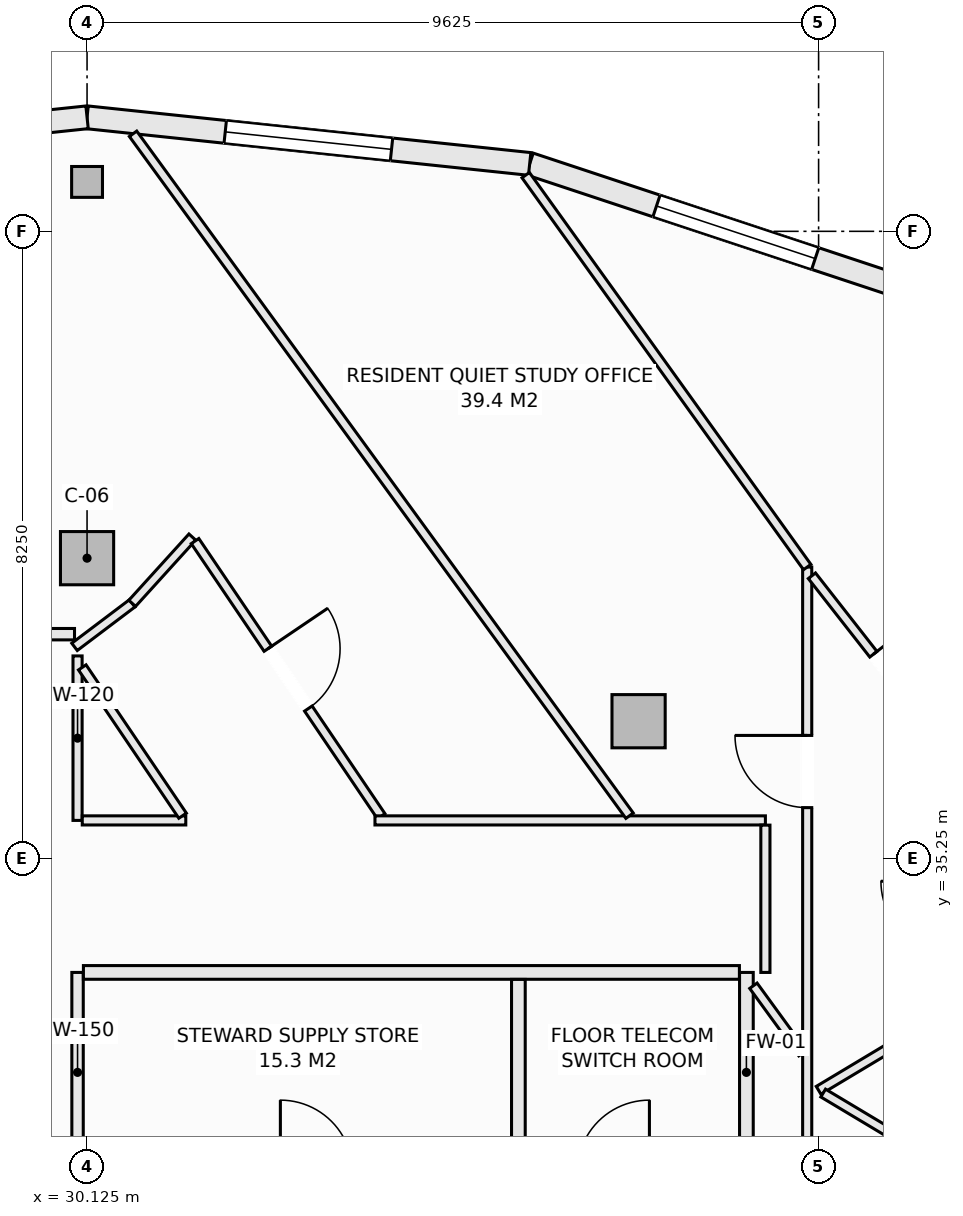
"""IFC4 building model, lengths in metres.
Left out: names, types, materials, properties, quantities, classifications, styles, units other than length and angle.
Written with IfcOpenShell. Run it as: python <this file> out.ifc"""

import sys

from ifc_helpers import new_model, si_unit, direction, frame, frame_2d, origin, origin_2d, place, context, subcontext, project, spatial, rectangle, hollow_rectangle, extrude, element, fill, save


model = new_model("IFC4")
c1 = context("Model", 3, precision=1e-05, world=origin(), true_north=direction((0.0, 1.0)))
c2 = subcontext(c1, "Body", "Model", "MODEL_VIEW")
j1 = project(units=[si_unit("LENGTHUNIT", "METRE"), si_unit("PLANEANGLEUNIT", "RADIAN")], contexts=[c1])
p1 = place(None, origin())
s1 = spatial("IfcSite", under=j1, at=p1, CompositionType="ELEMENT")
p2 = place(p1, origin())
s2 = spatial("IfcBuilding", under=s1, at=p2, CompositionType="ELEMENT")
p3 = place(p2, frame((0.0, 0.0, 245.9)))
s3 = spatial("IfcBuildingStorey", under=s2, at=p3, CompositionType="ELEMENT", Elevation=245.9)
p4 = place(p3, frame((30.125, 44.15, -0.27), z_axis=(0.0, 0.0, 1.0), x_axis=(1.0, 0.0, 0.0)))
e1 = element("IfcColumn", 1, at=p4, inside=s3, PredefinedType="COLUMN", context=c2, shape_type="SweptSolid", body=[
    extrude(hollow_rectangle(XDim=0.406, YDim=0.406, WallThickness=0.016, at=origin_2d()), origin(), (0.0, 0.0, 1.0), 3.3),
])
for number, where, z_axis, x_axis in (
    (2, (37.382, 37.055, -0.27), (0.0, 0.0, 1.0), (1.0, 0.0, 0.0)),
    (3, (30.125, 39.2, -0.27), (0.0, 0.0, 1.0), (1.0, 0.0, 0.0)),
):
    element("IfcColumn", number, at=place(p3, frame(where, z_axis=z_axis, x_axis=x_axis)), inside=s3, PredefinedType="COLUMN", context=c2, shape_type="SweptSolid", body=[
        extrude(rectangle(XDim=0.7, YDim=0.7, at=origin_2d()), origin(), (0.0, 0.0, 1.0), 3.3),
    ])
p5 = place(p3, frame((35.948, 44.387, 0.0), z_axis=(0.0, 0.0, 1.0), x_axis=(0.949232769585, -0.314574552605, 0.0)))
e4 = element("IfcWall", 4, at=p5, inside=s3, PredefinedType="SOLIDWALL", context=c2, shape_type="SweptSolid", body=[
    extrude(rectangle(XDim=5.717, YDim=0.3, at=frame_2d((2.858, 0.0))), origin(), (0.0, 0.0, 1.0), 2.605),
])
p6 = place(p5, frame((1.758, 0.0, 0.72)))
e5 = element("IfcOpeningElement", 5, at=p6, cuts=e4, PredefinedType="OPENING", context=c2, shape_type="SweptSolid", body=[
    extrude(rectangle(XDim=2.2, YDim=1.65, at=frame_2d((1.1, 0.825))), frame((0.0, 0.16, 0.0), z_axis=(0.0, -1.0, 0.0), x_axis=(1.0, 0.0, 0.0)), (0.0, 0.0, 1.0), 0.32),
])
p7 = place(p3, frame((30.125, 45.0, 0.0), z_axis=(0.0, 0.0, 1.0), x_axis=(0.994500425783, -0.10473253132, 0.0)))
e6 = element("IfcWall", 6, at=p7, inside=s3, PredefinedType="SOLIDWALL", context=c2, shape_type="SweptSolid", body=[
    extrude(rectangle(XDim=5.856, YDim=0.3, at=frame_2d((2.928, 0.0))), origin(), (0.0, 0.0, 1.0), 2.605),
])
p8 = place(p7, frame((1.828, 0.0, 0.72)))
e7 = element("IfcOpeningElement", 7, at=p8, cuts=e6, PredefinedType="OPENING", context=c2, shape_type="SweptSolid", body=[
    extrude(rectangle(XDim=2.2, YDim=1.65, at=frame_2d((1.1, 0.825))), frame((0.0, 0.16, 0.0), z_axis=(0.0, -1.0, 0.0), x_axis=(1.0, 0.0, 0.0)), (0.0, 0.0, 1.0), 0.32),
])
p9 = place(p3, frame((24.302, 44.387, 0.0), z_axis=(0.0, 0.0, 1.0), x_axis=(0.994500425783, 0.10473253132, 0.0)))
e8 = element("IfcWall", 8, at=p9, inside=s3, PredefinedType="SOLIDWALL", context=c2, shape_type="SweptSolid", body=[
    extrude(rectangle(XDim=5.856, YDim=0.3, at=frame_2d((2.928, 0.0))), origin(), (0.0, 0.0, 1.0), 2.605),
])
p10 = place(p9, frame((1.828, 0.0, 0.72)))
e9 = element("IfcOpeningElement", 9, at=p10, cuts=e8, PredefinedType="OPENING", context=c2, shape_type="SweptSolid", body=[
    extrude(rectangle(XDim=2.2, YDim=1.65, at=frame_2d((1.1, 0.825))), frame((0.0, 0.16, 0.0), z_axis=(0.0, -1.0, 0.0), x_axis=(1.0, 0.0, 0.0)), (0.0, 0.0, 1.0), 0.32),
])
p11 = place(p3, frame((30.0, 31.12, 0.0), z_axis=(0.0, 0.0, 1.0), x_axis=(0.0, 1.0, 0.0)))
e10 = element("IfcWall", 10, at=p11, inside=s3, PredefinedType="PARTITIONING", context=c2, shape_type="SweptSolid", body=[
    extrude(rectangle(XDim=2.63, YDim=0.15, at=frame_2d((1.315, 0.0))), origin(), (0.0, 0.0, 1.0), 3.03),
])
p12 = place(p3, frame((30.0, 35.75, 0.0), z_axis=(0.0, 0.0, 1.0), x_axis=(0.0, 1.0, 0.0)))
e11 = element("IfcWall", 11, at=p12, inside=s3, PredefinedType="PARTITIONING", context=c2, shape_type="SweptSolid", body=[
    extrude(rectangle(XDim=2.164, YDim=0.12, at=frame_2d((1.082, 0.0))), origin(), (0.0, 0.0, 1.0), 3.03),
])
p13 = place(p3, frame((38.8, 31.12, 0.0), z_axis=(0.0, 0.0, 1.0), x_axis=(0.0, 1.0, 0.0)))
e12 = element("IfcWall", 12, at=p13, inside=s3, PredefinedType="SOLIDWALL", context=c2, shape_type="SweptSolid", body=[
    extrude(rectangle(XDim=2.63, YDim=0.18, at=frame_2d((1.315, 0.0))), origin(), (0.0, 0.0, 1.0), 3.03),
])
p14 = place(p3, frame((30.077, 33.75, 0.0), z_axis=(0.0, 0.0, 1.0), x_axis=(1.0, 0.0, 0.0)))
e13 = element("IfcWall", 13, at=p14, inside=s3, PredefinedType="SOLIDWALL", context=c2, shape_type="SweptSolid", body=[
    extrude(rectangle(XDim=8.631, YDim=0.18, at=frame_2d((4.315, 0.0))), origin(), (0.0, 0.0, 1.0), 3.03),
])
p15 = place(p3, frame((35.8, 31.212, 0.0), z_axis=(0.0, 0.0, 1.0), x_axis=(0.0, 1.0, 0.0)))
e14 = element("IfcWall", 14, at=p15, inside=s3, PredefinedType="SOLIDWALL", context=c2, shape_type="SweptSolid", body=[
    extrude(rectangle(XDim=2.446, YDim=0.18, at=frame_2d((1.223, 0.0))), origin(), (0.0, 0.0, 1.0), 3.03),
])
p16 = place(p3, frame((27.227, 38.2, 0.0), z_axis=(0.0, 0.0, 1.0), x_axis=(1.0, 0.0, 0.0)))
e15 = element("IfcWall", 15, at=p16, inside=s3, PredefinedType="PARTITIONING", context=c2, shape_type="SweptSolid", body=[
    extrude(rectangle(XDim=2.733, YDim=0.15, at=frame_2d((1.366, 0.0))), origin(), (0.0, 0.0, 1.0), 3.03),
])
p17 = place(p3, frame((29.96, 38.033, 0.0), z_axis=(0.0, 0.0, 1.0), x_axis=(0.79811694623, 0.602502564426, 0.0)))
e16 = element("IfcWall", 16, at=p17, inside=s3, PredefinedType="PARTITIONING", context=c2, shape_type="SweptSolid", body=[
    extrude(rectangle(XDim=0.951, YDim=0.12, at=frame_2d((0.476, 0.0))), origin(), (0.0, 0.0, 1.0), 3.03),
])
p18 = place(p3, frame((30.719, 38.606, 0.0), z_axis=(0.0, 0.0, 1.0), x_axis=(0.671846687959, 0.740690237466, 0.0)))
e17 = element("IfcWall", 17, at=p18, inside=s3, PredefinedType="PARTITIONING", context=c2, shape_type="SweptSolid", body=[
    extrude(rectangle(XDim=1.177, YDim=0.12, at=frame_2d((0.589, 0.0))), origin(), (0.0, 0.0, 1.0), 3.03),
])
p19 = place(p3, frame((31.546, 39.425, 0.0), z_axis=(0.0, 0.0, 1.0), x_axis=(0.56035895857, -0.828249864202, 0.0)))
e18 = element("IfcWall", 18, at=p19, inside=s3, PredefinedType="PARTITIONING", context=c2, shape_type="SweptSolid", body=[
    extrude(rectangle(XDim=4.371, YDim=0.12, at=frame_2d((2.186, 0.0))), origin(), (0.0, 0.0, 1.0), 3.03),
])
p20 = place(p19, frame((1.71, 0.0, 0.0)))
e19 = element("IfcOpeningElement", 19, at=p20, cuts=e18, PredefinedType="OPENING", context=c2, shape_type="SweptSolid", body=[
    extrude(rectangle(XDim=0.95, YDim=2.1, at=frame_2d((0.475, 1.05))), frame((0.0, 0.07, 0.0), z_axis=(0.0, -1.0, 0.0), x_axis=(1.0, 0.0, 0.0)), (0.0, 0.0, 1.0), 0.14),
])
p21 = place(p3, frame((30.062, 35.75, 0.0), z_axis=(0.0, 0.0, 1.0), x_axis=(1.0, 0.0, 0.0)))
e20 = element("IfcWall", 20, at=p21, inside=s3, PredefinedType="PARTITIONING", context=c2, shape_type="SweptSolid", body=[
    extrude(rectangle(XDim=1.362, YDim=0.12, at=frame_2d((0.681, 0.0))), origin(), (0.0, 0.0, 1.0), 3.03),
])
p22 = place(p3, frame((33.913, 35.75, 0.0), z_axis=(0.0, 0.0, 1.0), x_axis=(1.0, 0.0, 0.0)))
e21 = element("IfcWall", 21, at=p22, inside=s3, PredefinedType="PARTITIONING", context=c2, shape_type="SweptSolid", body=[
    extrude(rectangle(XDim=5.137, YDim=0.12, at=frame_2d((2.568, 0.0))), origin(), (0.0, 0.0, 1.0), 2.478),
])
p23 = place(p3, frame((39.05, 33.75, 0.0), z_axis=(0.0, 0.0, 1.0), x_axis=(0.0, 1.0, 0.0)))
e22 = element("IfcWall", 22, at=p23, inside=s3, PredefinedType="PARTITIONING", context=c2, shape_type="SweptSolid", body=[
    extrude(rectangle(XDim=1.938, YDim=0.12, at=frame_2d((0.969, 0.0))), origin(), (0.0, 0.0, 1.0), 3.03),
])
p24 = place(p3, frame((39.6, 31.212, 0.0), z_axis=(0.0, 0.0, 1.0), x_axis=(0.0, 1.0, 0.0)))
e23 = element("IfcWall", 23, at=p24, inside=s3, PredefinedType="PARTITIONING", context=c2, shape_type="SweptSolid", body=[
    extrude(rectangle(XDim=7.871, YDim=0.12, at=frame_2d((3.936, 0.0))), origin(), (0.0, 0.0, 1.0), 3.03),
])
p25 = place(p24, frame((4.706, 0.0, 0.0)))
e24 = element("IfcOpeningElement", 24, at=p25, cuts=e23, PredefinedType="OPENING", context=c2, shape_type="SweptSolid", body=[
    extrude(rectangle(XDim=0.95, YDim=2.1, at=frame_2d((0.475, 1.05))), frame((0.0, 0.07, 0.0), z_axis=(0.0, -1.0, 0.0), x_axis=(1.0, 0.0, 0.0)), (0.0, 0.0, 1.0), 0.14),
])
p26 = place(p3, frame((39.662, 38.969, 0.0), z_axis=(0.0, 0.0, 1.0), x_axis=(0.616500468458, -0.787354540465, 0.0)))
e25 = element("IfcWall", 25, at=p26, inside=s3, PredefinedType="PARTITIONING", context=c2, shape_type="SweptSolid", body=[
    extrude(rectangle(XDim=3.014, YDim=0.12, at=frame_2d((1.507, 0.0))), origin(), (0.0, 0.0, 1.0), 3.03),
])
p27 = place(p26, frame((1.312, 0.0, 0.0)))
e26 = element("IfcOpeningElement", 26, at=p27, cuts=e25, PredefinedType="OPENING", context=c2, shape_type="SweptSolid", body=[
    extrude(rectangle(XDim=0.95, YDim=2.1, at=frame_2d((0.475, 1.05))), frame((0.0, 0.07, 0.0), z_axis=(0.0, -1.0, 0.0), x_axis=(1.0, 0.0, 0.0)), (0.0, 0.0, 1.0), 0.14),
])
p28 = place(p3, frame((39.75, 32.199, 0.0), z_axis=(0.0, 0.0, 1.0), x_axis=(0.857702120906, 0.514146935996, 0.0)))
e27 = element("IfcWall", 27, at=p28, inside=s3, PredefinedType="PARTITIONING", context=c2, shape_type="SweptSolid", body=[
    extrude(rectangle(XDim=1.441, YDim=0.12, at=frame_2d((0.721, 0.0))), origin(), (0.0, 0.0, 1.0), 3.03),
])
p29 = place(p3, frame((39.81, 32.163, 0.0), z_axis=(0.0, 0.0, 1.0), x_axis=(0.858011245414, -0.513630901273, 0.0)))
e28 = element("IfcWall", 28, at=p29, inside=s3, PredefinedType="PARTITIONING", context=c2, shape_type="SweptSolid", body=[
    extrude(rectangle(XDim=1.37, YDim=0.12, at=frame_2d((0.685, 0.0))), origin(), (0.0, 0.0, 1.0), 3.03),
])
p30 = place(p3, frame((30.062, 37.763, 0.0), z_axis=(0.0, 0.0, 1.0), x_axis=(0.560355372245, -0.828252290547, 0.0)))
e29 = element("IfcWall", 29, at=p30, inside=s3, PredefinedType="PARTITIONING", context=c2, shape_type="SweptSolid", body=[
    extrude(rectangle(XDim=2.356, YDim=0.12, at=frame_2d((1.178, 0.0))), origin(), (0.0, 0.0, 1.0), 3.03),
])
p31 = place(p3, frame((30.73, 44.783, 0.0), z_axis=(0.0, 0.0, 1.0), x_axis=(0.588659483045, -0.808381106299, 0.0)))
e30 = element("IfcWall", 30, at=p31, inside=s3, PredefinedType="PARTITIONING", context=c2, shape_type="SweptSolid", body=[
    extrude(rectangle(XDim=11.098, YDim=0.12, at=frame_2d((5.549, 0.0))), origin(), (0.0, 0.0, 1.0), 2.478),
])
p32 = place(p3, frame((38.892, 33.575, 0.0), z_axis=(0.0, 0.0, 1.0), x_axis=(0.5886213307, -0.808408887287, 0.0)))
e31 = element("IfcWall", 31, at=p32, inside=s3, PredefinedType="PARTITIONING", context=c2, shape_type="SweptSolid", body=[
    extrude(rectangle(XDim=1.097, YDim=0.12, at=frame_2d((0.549, 0.0))), origin(), (0.0, 0.0, 1.0), 3.03),
])
p33 = place(p3, frame((35.896, 44.24, 0.0), z_axis=(0.0, 0.0, 1.0), x_axis=(0.583414962814, -0.812174230793, 0.0)))
e32 = element("IfcWall", 32, at=p33, inside=s3, PredefinedType="PARTITIONING", context=c2, shape_type="SweptSolid", body=[
    extrude(rectangle(XDim=6.349, YDim=0.12, at=frame_2d((3.175, 0.0))), origin(), (0.0, 0.0, 1.0), 3.03),
])
p34 = place(p6, origin())
e33 = element("IfcWindow", 33, at=p34, inside=s3, PartitioningType="SINGLE_PANEL", PredefinedType="WINDOW", context=c2, shape_type="SweptSolid", body=[
    extrude(rectangle(XDim=2.2, YDim=1.65, at=frame_2d((1.1, 0.825))), frame((0.0, 0.03, 0.0), z_axis=(0.0, -1.0, 0.0), x_axis=(1.0, 0.0, 0.0)), (0.0, 0.0, 1.0), 0.06),
])
fill(e5, e33)
p35 = place(p8, origin())
e34 = element("IfcWindow", 34, at=p35, inside=s3, PartitioningType="SINGLE_PANEL", PredefinedType="WINDOW", context=c2, shape_type="SweptSolid", body=[
    extrude(rectangle(XDim=2.2, YDim=1.65, at=frame_2d((1.1, 0.825))), frame((0.0, 0.03, 0.0), z_axis=(0.0, -1.0, 0.0), x_axis=(1.0, 0.0, 0.0)), (0.0, 0.0, 1.0), 0.06),
])
fill(e7, e34)
p36 = place(p27, origin())
e35 = element("IfcDoor", 35, at=p36, inside=s3, OperationType="SINGLE_SWING_LEFT", PredefinedType="DOOR", context=c2, shape_type="SweptSolid", body=[
    extrude(rectangle(XDim=0.95, YDim=2.1, at=frame_2d((0.475, 1.05))), frame((0.0, 0.025, 0.0), z_axis=(0.0, -1.0, 0.0), x_axis=(1.0, 0.0, 0.0)), (0.0, 0.0, 1.0), 0.05),
])
fill(e26, e35)
p37 = place(p25, origin())
e36 = element("IfcDoor", 36, at=p37, inside=s3, OperationType="SINGLE_SWING_RIGHT", PredefinedType="DOOR", context=c2, shape_type="SweptSolid", body=[
    extrude(rectangle(XDim=0.95, YDim=2.1, at=frame_2d((0.475, 1.05))), frame((0.0, 0.025, 0.0), z_axis=(0.0, -1.0, 0.0), x_axis=(1.0, 0.0, 0.0)), (0.0, 0.0, 1.0), 0.05),
])
fill(e24, e36)
p38 = place(p20, origin())
e37 = element("IfcDoor", 37, at=p38, inside=s3, OperationType="SINGLE_SWING_LEFT", PredefinedType="DOOR", context=c2, shape_type="SweptSolid", body=[
    extrude(rectangle(XDim=0.95, YDim=2.1, at=frame_2d((0.475, 1.05))), frame((0.0, 0.025, 0.0), z_axis=(0.0, -1.0, 0.0), x_axis=(1.0, 0.0, 0.0)), (0.0, 0.0, 1.0), 0.05),
])
fill(e19, e37)
save(model, sys.argv[1])
